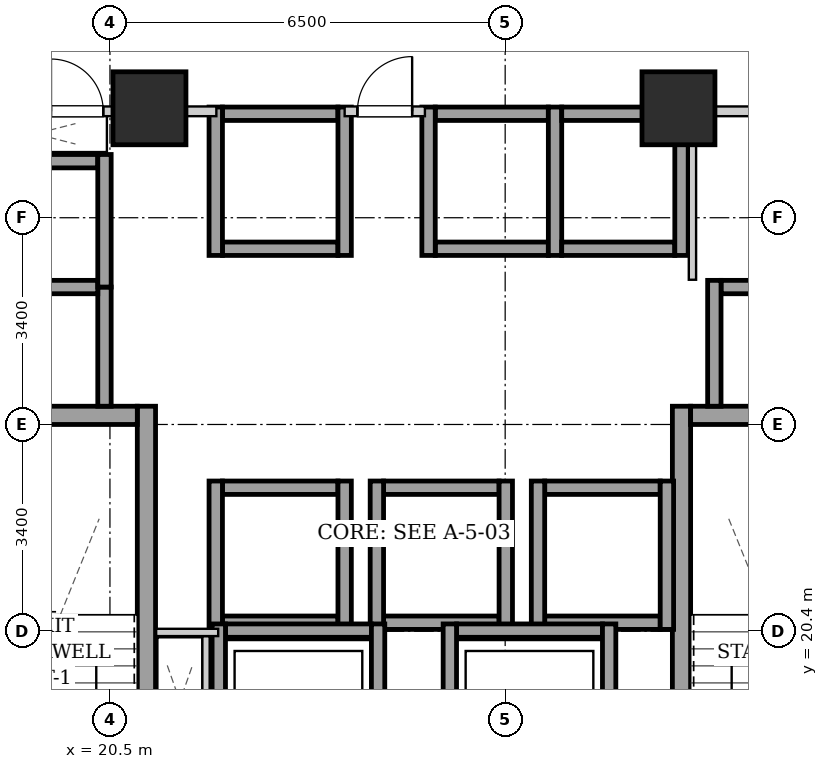
"""IFC4 building model, lengths in metres.
Left out: names, types, materials, properties, quantities, classifications, styles, units other than length and angle.
Written with IfcOpenShell. Run it as: python <this file> out.ifc"""

import sys

from ifc_helpers import new_model, si_unit, direction, frame, frame_2d, origin, origin_2d, place, context, subcontext, project, spatial, rectangle, extrude, element, fill, save


model = new_model("IFC4")
c1 = context("Model", 3, precision=1e-05, world=origin(), true_north=direction((0.0, 1.0)))
c2 = subcontext(c1, "Body", "Model", "MODEL_VIEW")
j1 = project(units=[si_unit("LENGTHUNIT", "METRE"), si_unit("PLANEANGLEUNIT", "RADIAN")], contexts=[c1])
p1 = place(None, origin())
s1 = spatial("IfcSite", under=j1, at=p1, CompositionType="ELEMENT")
p2 = place(p1, origin())
s2 = spatial("IfcBuilding", under=s1, at=p2, CompositionType="ELEMENT")
p3 = place(p2, frame((0.0, 0.0, 6.0)))
s3 = spatial("IfcBuildingStorey", under=s2, at=p3, CompositionType="ELEMENT", Elevation=6.0)
for number, where, z_axis, x_axis in (
    (1, (21.15, 29.0, 0.0), (0.0, 0.0, 1.0), (1.0, 0.0, 0.0)),
    (2, (29.85, 29.0, 0.0), (0.0, 0.0, 1.0), (1.0, 0.0, 0.0)),
):
    element("IfcColumn", number, at=place(p3, frame(where, z_axis=z_axis, x_axis=x_axis)), inside=s3, PredefinedType="COLUMN", context=c2, shape_type="SweptSolid", body=[
        extrude(rectangle(XDim=1.2, YDim=1.2, at=origin_2d()), origin(), (0.0, 0.0, 1.0), 5.2),
    ])
p4 = place(p3, frame((21.1, 15.1, 0.0), z_axis=(0.0, 0.0, 1.0), x_axis=(0.0, 1.0, 0.0)))
e3 = element("IfcWall", 3, at=p4, inside=s3, PredefinedType="SHEAR", context=c2, shape_type="SweptSolid", body=[
    extrude(rectangle(XDim=9.0, YDim=0.3, at=frame_2d((4.5, 0.0))), origin(), (0.0, 0.0, 1.0), 4.88),
])
p5 = place(p3, frame((18.1, 23.95, 0.0), z_axis=(0.0, 0.0, 1.0), x_axis=(1.0, 0.0, 0.0)))
e4 = element("IfcWall", 4, at=p5, inside=s3, PredefinedType="SHEAR", context=c2, shape_type="SweptSolid", body=[
    extrude(rectangle(XDim=2.85, YDim=0.3, at=frame_2d((1.425, 0.0))), origin(), (0.0, 0.0, 1.0), 4.88),
])
p6 = place(p3, frame((29.9, 15.1, 0.0), z_axis=(0.0, 0.0, 1.0), x_axis=(0.0, 1.0, 0.0)))
e5 = element("IfcWall", 5, at=p6, inside=s3, PredefinedType="SHEAR", context=c2, shape_type="SweptSolid", body=[
    extrude(rectangle(XDim=9.0, YDim=0.3, at=frame_2d((4.5, 0.0))), origin(), (0.0, 0.0, 1.0), 4.88),
])
p7 = place(p3, frame((30.05, 23.95, 0.0), z_axis=(0.0, 0.0, 1.0), x_axis=(1.0, 0.0, 0.0)))
e6 = element("IfcWall", 6, at=p7, inside=s3, PredefinedType="SHEAR", context=c2, shape_type="SweptSolid", body=[
    extrude(rectangle(XDim=2.85, YDim=0.3, at=frame_2d((1.425, 0.0))), origin(), (0.0, 0.0, 1.0), 4.88),
])
for number, where, z_axis, x_axis in (
    (7, (22.35, 26.69, 0.0), (0.0, 0.0, 1.0), (1.0, 0.0, 0.0)),
    (8, (22.35, 28.91, 0.0), (0.0, 0.0, 1.0), (1.0, 0.0, 0.0)),
):
    element("IfcWall", number, at=place(p3, frame(where, z_axis=z_axis, x_axis=x_axis)), inside=s3, PredefinedType="SHEAR", context=c2, shape_type="SweptSolid", body=[
        extrude(rectangle(XDim=1.9, YDim=0.22, at=frame_2d((0.95, 0.0))), origin(), (0.0, 0.0, 1.0), 4.88),
    ])
for number, where, z_axis, x_axis in (
    (9, (22.24, 26.58, 0.0), (0.0, 0.0, 1.0), (0.0, 1.0, 0.0)),
    (10, (24.36, 26.58, 0.0), (0.0, 0.0, 1.0), (0.0, 1.0, 0.0)),
):
    element("IfcWall", number, at=place(p3, frame(where, z_axis=z_axis, x_axis=x_axis)), inside=s3, PredefinedType="SHEAR", context=c2, shape_type="SweptSolid", body=[
        extrude(rectangle(XDim=2.44, YDim=0.22, at=frame_2d((1.22, 0.0))), origin(), (0.0, 0.0, 1.0), 4.88),
    ])
for number, where, z_axis, x_axis in (
    (11, (25.85, 26.69, 0.0), (0.0, 0.0, 1.0), (1.0, 0.0, 0.0)),
    (12, (25.85, 28.91, 0.0), (0.0, 0.0, 1.0), (1.0, 0.0, 0.0)),
):
    element("IfcWall", number, at=place(p3, frame(where, z_axis=z_axis, x_axis=x_axis)), inside=s3, PredefinedType="SHEAR", context=c2, shape_type="SweptSolid", body=[
        extrude(rectangle(XDim=1.86, YDim=0.22, at=frame_2d((0.93, 0.0))), origin(), (0.0, 0.0, 1.0), 4.88),
    ])
for number, where, z_axis, x_axis in (
    (13, (25.74, 26.58, 0.0), (0.0, 0.0, 1.0), (0.0, 1.0, 0.0)),
    (14, (27.82, 26.58, 0.0), (0.0, 0.0, 1.0), (0.0, 1.0, 0.0)),
):
    element("IfcWall", number, at=place(p3, frame(where, z_axis=z_axis, x_axis=x_axis)), inside=s3, PredefinedType="SHEAR", context=c2, shape_type="SweptSolid", body=[
        extrude(rectangle(XDim=2.44, YDim=0.22, at=frame_2d((1.22, 0.0))), origin(), (0.0, 0.0, 1.0), 4.88),
    ])
for number, where, z_axis, x_axis in (
    (15, (27.93, 26.69, 0.0), (0.0, 0.0, 1.0), (1.0, 0.0, 0.0)),
    (16, (27.93, 28.91, 0.0), (0.0, 0.0, 1.0), (1.0, 0.0, 0.0)),
):
    element("IfcWall", number, at=place(p3, frame(where, z_axis=z_axis, x_axis=x_axis)), inside=s3, PredefinedType="SHEAR", context=c2, shape_type="SweptSolid", body=[
        extrude(rectangle(XDim=1.86, YDim=0.22, at=frame_2d((0.93, 0.0))), origin(), (0.0, 0.0, 1.0), 4.88),
    ])
p8 = place(p3, frame((29.9, 26.58, 0.0), z_axis=(0.0, 0.0, 1.0), x_axis=(0.0, 1.0, 0.0)))
e17 = element("IfcWall", 17, at=p8, inside=s3, PredefinedType="SHEAR", context=c2, shape_type="SweptSolid", body=[
    extrude(rectangle(XDim=2.44, YDim=0.22, at=frame_2d((1.22, 0.0))), origin(), (0.0, 0.0, 1.0), 4.88),
])
for number, where, z_axis, x_axis in (
    (18, (22.35, 20.54, 0.0), (0.0, 0.0, 1.0), (1.0, 0.0, 0.0)),
    (19, (22.35, 22.76, 0.0), (0.0, 0.0, 1.0), (1.0, 0.0, 0.0)),
):
    element("IfcWall", number, at=place(p3, frame(where, z_axis=z_axis, x_axis=x_axis)), inside=s3, PredefinedType="SHEAR", context=c2, shape_type="SweptSolid", body=[
        extrude(rectangle(XDim=1.9, YDim=0.22, at=frame_2d((0.95, 0.0))), origin(), (0.0, 0.0, 1.0), 4.88),
    ])
for number, where, z_axis, x_axis in (
    (20, (22.24, 20.43, 0.0), (0.0, 0.0, 1.0), (0.0, 1.0, 0.0)),
    (21, (24.36, 20.43, 0.0), (0.0, 0.0, 1.0), (0.0, 1.0, 0.0)),
):
    element("IfcWall", number, at=place(p3, frame(where, z_axis=z_axis, x_axis=x_axis)), inside=s3, PredefinedType="SHEAR", context=c2, shape_type="SweptSolid", body=[
        extrude(rectangle(XDim=2.44, YDim=0.22, at=frame_2d((1.22, 0.0))), origin(), (0.0, 0.0, 1.0), 4.88),
    ])
for number, where, z_axis, x_axis in (
    (22, (25.0, 20.54, 0.0), (0.0, 0.0, 1.0), (1.0, 0.0, 0.0)),
    (23, (25.0, 22.76, 0.0), (0.0, 0.0, 1.0), (1.0, 0.0, 0.0)),
):
    element("IfcWall", number, at=place(p3, frame(where, z_axis=z_axis, x_axis=x_axis)), inside=s3, PredefinedType="SHEAR", context=c2, shape_type="SweptSolid", body=[
        extrude(rectangle(XDim=1.9, YDim=0.22, at=frame_2d((0.95, 0.0))), origin(), (0.0, 0.0, 1.0), 4.88),
    ])
for number, where, z_axis, x_axis in (
    (24, (24.89, 20.43, 0.0), (0.0, 0.0, 1.0), (0.0, 1.0, 0.0)),
    (25, (27.01, 20.43, 0.0), (0.0, 0.0, 1.0), (0.0, 1.0, 0.0)),
):
    element("IfcWall", number, at=place(p3, frame(where, z_axis=z_axis, x_axis=x_axis)), inside=s3, PredefinedType="SHEAR", context=c2, shape_type="SweptSolid", body=[
        extrude(rectangle(XDim=2.44, YDim=0.22, at=frame_2d((1.22, 0.0))), origin(), (0.0, 0.0, 1.0), 4.88),
    ])
for number, where, z_axis, x_axis in (
    (26, (27.65, 20.54, 0.0), (0.0, 0.0, 1.0), (1.0, 0.0, 0.0)),
    (27, (27.65, 22.76, 0.0), (0.0, 0.0, 1.0), (1.0, 0.0, 0.0)),
):
    element("IfcWall", number, at=place(p3, frame(where, z_axis=z_axis, x_axis=x_axis)), inside=s3, PredefinedType="SHEAR", context=c2, shape_type="SweptSolid", body=[
        extrude(rectangle(XDim=1.9, YDim=0.22, at=frame_2d((0.95, 0.0))), origin(), (0.0, 0.0, 1.0), 4.88),
    ])
for number, where, z_axis, x_axis in (
    (28, (27.54, 20.43, 0.0), (0.0, 0.0, 1.0), (0.0, 1.0, 0.0)),
    (29, (29.66, 20.43, 0.0), (0.0, 0.0, 1.0), (0.0, 1.0, 0.0)),
):
    element("IfcWall", number, at=place(p3, frame(where, z_axis=z_axis, x_axis=x_axis)), inside=s3, PredefinedType="SHEAR", context=c2, shape_type="SweptSolid", body=[
        extrude(rectangle(XDim=2.44, YDim=0.22, at=frame_2d((1.22, 0.0))), origin(), (0.0, 0.0, 1.0), 4.88),
    ])
p9 = place(p3, frame((20.41, 24.1, 0.0), z_axis=(0.0, 0.0, 1.0), x_axis=(0.0, 1.0, 0.0)))
e30 = element("IfcWall", 30, at=p9, inside=s3, PredefinedType="SHEAR", context=c2, shape_type="SweptSolid", body=[
    extrude(rectangle(XDim=1.96, YDim=0.22, at=frame_2d((0.98, 0.0))), origin(), (0.0, 0.0, 1.0), 4.88),
])
for number, where, z_axis, x_axis in (
    (31, (18.4, 26.06, 0.0), (0.0, 0.0, 1.0), (1.0, 0.0, 0.0)),
    (32, (18.4, 28.13, 0.0), (0.0, 0.0, 1.0), (1.0, 0.0, 0.0)),
):
    element("IfcWall", number, at=place(p3, frame(where, z_axis=z_axis, x_axis=x_axis)), inside=s3, PredefinedType="SHEAR", context=c2, shape_type="SweptSolid", body=[
        extrude(rectangle(XDim=1.9, YDim=0.22, at=frame_2d((0.95, 0.0))), origin(), (0.0, 0.0, 1.0), 4.88),
    ])
p10 = place(p3, frame((20.41, 26.06, 0.0), z_axis=(0.0, 0.0, 1.0), x_axis=(0.0, 1.0, 0.0)))
e33 = element("IfcWall", 33, at=p10, inside=s3, PredefinedType="SHEAR", context=c2, shape_type="SweptSolid", body=[
    extrude(rectangle(XDim=2.18, YDim=0.22, at=frame_2d((1.09, 0.0))), origin(), (0.0, 0.0, 1.0), 4.88),
])
p11 = place(p3, frame((30.55, 26.06, 0.0), z_axis=(0.0, 0.0, 1.0), x_axis=(1.0, 0.0, 0.0)))
e34 = element("IfcWall", 34, at=p11, inside=s3, PredefinedType="SHEAR", context=c2, shape_type="SweptSolid", body=[
    extrude(rectangle(XDim=1.9, YDim=0.22, at=frame_2d((0.95, 0.0))), origin(), (0.0, 0.0, 1.0), 4.88),
])
p12 = place(p3, frame((30.44, 24.1, 0.0), z_axis=(0.0, 0.0, 1.0), x_axis=(0.0, 1.0, 0.0)))
e35 = element("IfcWall", 35, at=p12, inside=s3, PredefinedType="SHEAR", context=c2, shape_type="SweptSolid", body=[
    extrude(rectangle(XDim=2.07, YDim=0.22, at=frame_2d((1.035, 0.0))), origin(), (0.0, 0.0, 1.0), 4.88),
])
p13 = place(p3, frame((22.4, 20.41, 0.0), z_axis=(0.0, 0.0, 1.0), x_axis=(1.0, 0.0, 0.0)))
e36 = element("IfcWall", 36, at=p13, inside=s3, PredefinedType="SHEAR", context=c2, shape_type="SweptSolid", body=[
    extrude(rectangle(XDim=2.4, YDim=0.22, at=frame_2d((1.2, 0.0))), origin(), (0.0, 0.0, 1.0), 4.88),
])
for number, where, z_axis, x_axis in (
    (37, (22.29, 17.98, 0.0), (0.0, 0.0, 1.0), (0.0, 1.0, 0.0)),
    (38, (24.91, 17.98, 0.0), (0.0, 0.0, 1.0), (0.0, 1.0, 0.0)),
):
    element("IfcWall", number, at=place(p3, frame(where, z_axis=z_axis, x_axis=x_axis)), inside=s3, PredefinedType="SHEAR", context=c2, shape_type="SweptSolid", body=[
        extrude(rectangle(XDim=2.54, YDim=0.22, at=frame_2d((1.27, 0.0))), origin(), (0.0, 0.0, 1.0), 4.88),
    ])
p14 = place(p3, frame((26.2, 20.41, 0.0), z_axis=(0.0, 0.0, 1.0), x_axis=(1.0, 0.0, 0.0)))
e39 = element("IfcWall", 39, at=p14, inside=s3, PredefinedType="SHEAR", context=c2, shape_type="SweptSolid", body=[
    extrude(rectangle(XDim=2.4, YDim=0.22, at=frame_2d((1.2, 0.0))), origin(), (0.0, 0.0, 1.0), 4.88),
])
for number, where, z_axis, x_axis in (
    (40, (26.09, 17.98, 0.0), (0.0, 0.0, 1.0), (0.0, 1.0, 0.0)),
    (41, (28.71, 17.98, 0.0), (0.0, 0.0, 1.0), (0.0, 1.0, 0.0)),
):
    element("IfcWall", number, at=place(p3, frame(where, z_axis=z_axis, x_axis=x_axis)), inside=s3, PredefinedType="SHEAR", context=c2, shape_type="SweptSolid", body=[
        extrude(rectangle(XDim=2.54, YDim=0.22, at=frame_2d((1.27, 0.0))), origin(), (0.0, 0.0, 1.0), 4.88),
    ])
p15 = place(p3, frame((24.36, 28.95, 0.0), z_axis=(0.0, 0.0, 1.0), x_axis=(1.0, 0.0, 0.0)))
e42 = element("IfcWall", 42, at=p15, inside=s3, PredefinedType="PARTITIONING", context=c2, shape_type="SweptSolid", body=[
    extrude(rectangle(XDim=1.32, YDim=0.16, at=frame_2d((0.66, 0.0))), origin(), (0.0, 0.0, 1.0), 4.88),
])
p16 = place(p15, frame((0.21, 0.0, 0.0)))
e43 = element("IfcOpeningElement", 43, at=p16, cuts=e42, PredefinedType="OPENING", context=c2, shape_type="SweptSolid", body=[
    extrude(rectangle(XDim=0.9, YDim=2.05, at=frame_2d((0.45, 1.025))), frame((0.0, 0.09, 0.0), z_axis=(0.0, -1.0, 0.0), x_axis=(1.0, 0.0, 0.0)), (0.0, 0.0, 1.0), 0.18),
])
p17 = place(p3, frame((17.96, 28.95, 0.0), z_axis=(0.0, 0.0, 1.0), x_axis=(1.0, 0.0, 0.0)))
e44 = element("IfcWall", 44, at=p17, inside=s3, PredefinedType="PARTITIONING", context=c2, shape_type="SweptSolid", body=[
    extrude(rectangle(XDim=4.29, YDim=0.16, at=frame_2d((2.145, 0.0))), origin(), (0.0, 0.0, 1.0), 4.88),
])
p18 = place(p17, frame((1.57, 0.0, 0.0)))
e45 = element("IfcOpeningElement", 45, at=p18, cuts=e44, PredefinedType="OPENING", context=c2, shape_type="SweptSolid", body=[
    extrude(rectangle(XDim=0.86, YDim=2.05, at=frame_2d((0.43, 1.025))), frame((0.0, 0.09, 0.0), z_axis=(0.0, -1.0, 0.0), x_axis=(1.0, 0.0, 0.0)), (0.0, 0.0, 1.0), 0.18),
])
p19 = place(p3, frame((22.08, 18.2, 0.0), z_axis=(0.0, 0.0, 1.0), x_axis=(0.0, 1.0, 0.0)))
e46 = element("IfcWall", 46, at=p19, inside=s3, PredefinedType="PARTITIONING", context=c2, shape_type="SweptSolid", body=[
    extrude(rectangle(XDim=2.12, YDim=0.12, at=frame_2d((1.06, 0.0))), origin(), (0.0, 0.0, 1.0), 4.88),
])
p20 = place(p3, frame((22.28, 20.38, 0.0), z_axis=(0.0, 0.0, 1.0), x_axis=(-1.0, 0.0, 0.0)))
e47 = element("IfcWall", 47, at=p20, inside=s3, PredefinedType="PARTITIONING", context=c2, shape_type="SweptSolid", body=[
    extrude(rectangle(XDim=1.02, YDim=0.12, at=frame_2d((0.51, 0.0))), origin(), (0.0, 0.0, 1.0), 4.88),
])
p21 = place(p3, frame((30.08, 26.18, 0.0), z_axis=(0.0, 0.0, 1.0), x_axis=(0.0, 1.0, 0.0)))
e48 = element("IfcWall", 48, at=p21, inside=s3, PredefinedType="PARTITIONING", context=c2, shape_type="SweptSolid", body=[
    extrude(rectangle(XDim=2.68, YDim=0.12, at=frame_2d((1.34, 0.0))), origin(), (0.0, 0.0, 1.0), 4.88),
])
p22 = place(p3, frame((30.08, 28.95, 0.0), z_axis=(0.0, 0.0, 1.0), x_axis=(1.0, 0.0, 0.0)))
e49 = element("IfcWall", 49, at=p22, inside=s3, PredefinedType="PARTITIONING", context=c2, shape_type="SweptSolid", body=[
    extrude(rectangle(XDim=2.96, YDim=0.16, at=frame_2d((1.48, 0.0))), origin(), (0.0, 0.0, 1.0), 4.88),
])
p23 = place(p22, frame((1.045, 0.0, 0.0)))
e50 = element("IfcOpeningElement", 50, at=p23, cuts=e49, PredefinedType="OPENING", context=c2, shape_type="SweptSolid", body=[
    extrude(rectangle(XDim=0.86, YDim=2.05, at=frame_2d((0.43, 1.025))), frame((0.0, 0.09, 0.0), z_axis=(0.0, -1.0, 0.0), x_axis=(1.0, 0.0, 0.0)), (0.0, 0.0, 1.0), 0.18),
])
p24 = place(p16, origin())
e51 = element("IfcDoor", 51, at=p24, inside=s3, OperationType="SINGLE_SWING_RIGHT", PredefinedType="DOOR", context=c2, shape_type="SweptSolid", body=[
    extrude(rectangle(XDim=0.9, YDim=2.05, at=frame_2d((0.45, 1.025))), frame((0.0, 0.025, 0.0), z_axis=(0.0, -1.0, 0.0), x_axis=(1.0, 0.0, 0.0)), (0.0, 0.0, 1.0), 0.05),
])
fill(e43, e51)
p25 = place(p18, origin())
e52 = element("IfcDoor", 52, at=p25, inside=s3, OperationType="SINGLE_SWING_LEFT", PredefinedType="DOOR", context=c2, shape_type="SweptSolid", body=[
    extrude(rectangle(XDim=0.86, YDim=2.05, at=frame_2d((0.43, 1.025))), frame((0.0, 0.025, 0.0), z_axis=(0.0, -1.0, 0.0), x_axis=(1.0, 0.0, 0.0)), (0.0, 0.0, 1.0), 0.05),
])
fill(e45, e52)
save(model, sys.argv[1])
